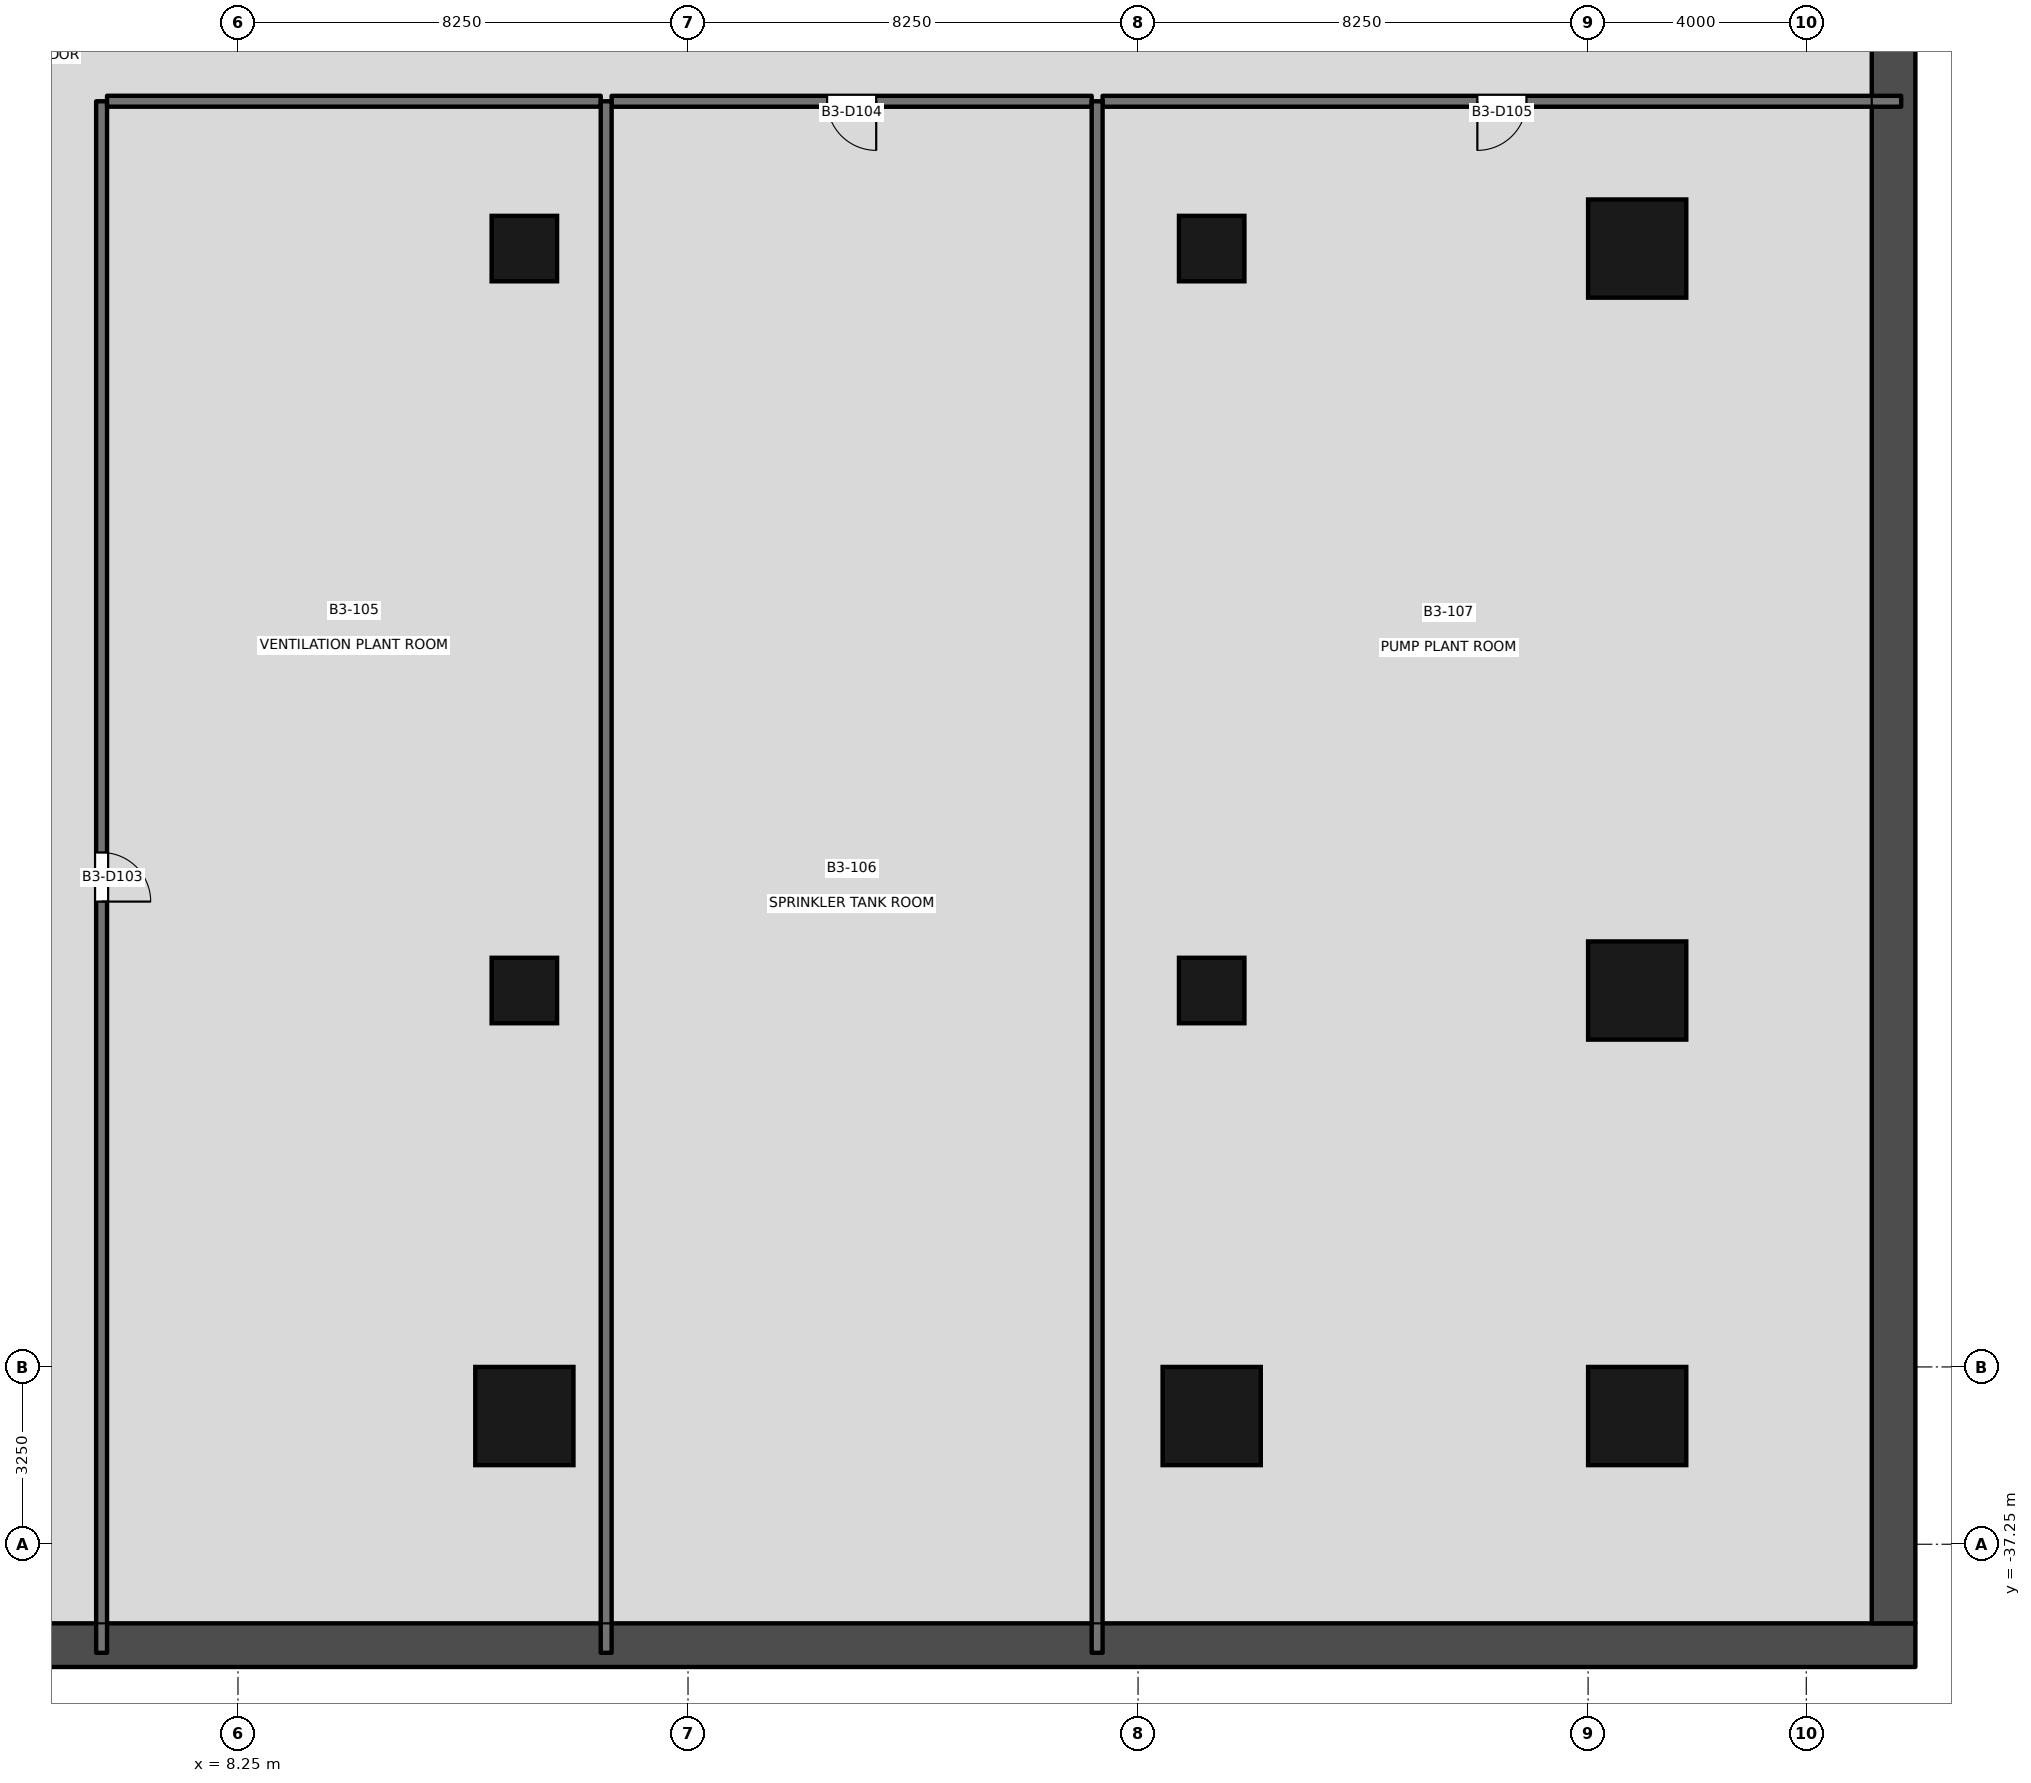
"""IFC4 building model, lengths in metres.
Left out: names, types, materials, properties, quantities, classifications, styles, units other than length and angle.
Written with IfcOpenShell. Run it as: python <this file> out.ifc"""

import sys

from ifc_helpers import new_model, si_unit, direction, frame, frame_2d, origin, origin_2d, place, context, subcontext, project, spatial, rectangle, extrude, element, fill, save


model = new_model("IFC4")
c1 = context("Model", 3, precision=1e-05, world=origin(), true_north=direction((0.0, 1.0)))
c2 = subcontext(c1, "Body", "Model", "MODEL_VIEW")
j1 = project(units=[si_unit("LENGTHUNIT", "METRE"), si_unit("PLANEANGLEUNIT", "RADIAN")], contexts=[c1])
p1 = place(None, origin())
s1 = spatial("IfcSite", under=j1, at=p1, CompositionType="ELEMENT")
p2 = place(p1, origin())
s2 = spatial("IfcBuilding", under=s1, at=p2, CompositionType="ELEMENT")
p3 = place(p2, frame((0.0, 0.0, -13.5)))
s3 = spatial("IfcBuildingStorey", under=s2, at=p3, CompositionType="ELEMENT", Elevation=-13.5)
p4 = place(p3, frame((-39.0, -39.1, -0.25), z_axis=(0.0, 0.0, 1.0), x_axis=(1.0, 0.0, 0.0)))
e1 = element("IfcWall", 1, at=p4, inside=s3, PredefinedType="SOLIDWALL", context=c2, shape_type="SweptSolid", body=[
    extrude(rectangle(XDim=78.0, YDim=0.8, at=frame_2d((39.0, 0.0))), origin(), (0.0, 0.0, 1.0), 4.05),
])
p5 = place(p3, frame((38.6, -38.7, -0.25), z_axis=(0.0, 0.0, 1.0), x_axis=(0.0, 1.0, 0.0)))
e2 = element("IfcWall", 2, at=p5, inside=s3, PredefinedType="SOLIDWALL", context=c2, shape_type="SweptSolid", body=[
    extrude(rectangle(XDim=51.9, YDim=0.8, at=frame_2d((25.95, 0.0))), origin(), (0.0, 0.0, 1.0), 4.05),
])
for number, where, z_axis, x_axis in (
    (3, (33.9, -34.9, -0.25), (0.0, 0.0, 1.0), (1.0, 0.0, 0.0)),
    (4, (13.5, -34.9, -0.25), (0.0, 0.0, 1.0), (1.0, 0.0, 0.0)),
    (5, (26.1, -34.9, -0.25), (0.0, 0.0, 1.0), (1.0, 0.0, 0.0)),
    (6, (33.9, -27.1, -0.25), (0.0, 0.0, 1.0), (0.0, 1.0, 0.0)),
    (7, (33.9, -13.5, -0.25), (0.0, 0.0, 1.0), (0.0, 1.0, 0.0)),
):
    element("IfcColumn", number, at=place(p3, frame(where, z_axis=z_axis, x_axis=x_axis)), inside=s3, PredefinedType="COLUMN", context=c2, shape_type="SweptSolid", body=[
        extrude(rectangle(XDim=1.8, YDim=1.8, at=origin_2d()), origin(), (0.0, 0.0, 1.0), 4.05),
    ])
for number, where, z_axis, x_axis in (
    (8, (13.5, -27.1, -0.25), (0.0, 0.0, 1.0), (1.0, 0.0, 0.0)),
    (9, (26.1, -27.1, -0.25), (0.0, 0.0, 1.0), (1.0, 0.0, 0.0)),
    (10, (13.5, -13.5, -0.25), (0.0, 0.0, 1.0), (1.0, 0.0, 0.0)),
    (11, (26.1, -13.5, -0.25), (0.0, 0.0, 1.0), (1.0, 0.0, 0.0)),
):
    element("IfcColumn", number, at=place(p3, frame(where, z_axis=z_axis, x_axis=x_axis)), inside=s3, PredefinedType="COLUMN", context=c2, shape_type="SweptSolid", body=[
        extrude(rectangle(XDim=1.2, YDim=1.2, at=origin_2d()), origin(), (0.0, 0.0, 1.0), 4.05),
    ])
p6 = place(p3, frame((5.75, -10.8, 0.0), z_axis=(0.0, 0.0, 1.0), x_axis=(0.0, -1.0, 0.0)))
e12 = element("IfcWall", 12, at=p6, inside=s3, PredefinedType="PARTITIONING", context=c2, shape_type="SweptSolid", body=[
    extrude(rectangle(XDim=28.44, YDim=0.2, at=frame_2d((14.22, 0.0))), origin(), (0.0, 0.0, 1.0), 2.8),
])
p7 = place(p6, frame((13.77, 0.0, 0.0)))
e13 = element("IfcOpeningElement", 13, at=p7, cuts=e12, PredefinedType="OPENING", context=c2, shape_type="SweptSolid", body=[
    extrude(rectangle(XDim=0.9, YDim=2.1, at=frame_2d((0.45, 1.05))), frame((0.0, 0.111, 0.0), z_axis=(0.0, -1.0, 0.0), x_axis=(1.0, 0.0, 0.0)), (0.0, 0.0, 1.0), 0.221),
])
p8 = place(p3, frame((14.9, -10.799, 0.0), z_axis=(0.0, 0.0, 1.0), x_axis=(-1.0, 0.0, 0.0)))
e14 = element("IfcWall", 14, at=p8, inside=s3, PredefinedType="PARTITIONING", context=c2, shape_type="SweptSolid", body=[
    extrude(rectangle(XDim=9.05, YDim=0.2, at=frame_2d((4.525, 0.0))), origin(), (0.0, 0.0, 1.0), 2.4),
])
p9 = place(p3, frame((23.9, -10.8, 0.0), z_axis=(0.0, 0.0, 1.0), x_axis=(-1.0, 0.0, 0.0)))
e15 = element("IfcWall", 15, at=p9, inside=s3, PredefinedType="PARTITIONING", context=c2, shape_type="SweptSolid", body=[
    extrude(rectangle(XDim=8.8, YDim=0.2, at=frame_2d((4.4, 0.0))), origin(), (0.0, 0.0, 1.0), 3.5),
])
p10 = place(p9, frame((3.95, 0.0, 0.0)))
e16 = element("IfcOpeningElement", 16, at=p10, cuts=e15, PredefinedType="OPENING", context=c2, shape_type="SweptSolid", body=[
    extrude(rectangle(XDim=0.9, YDim=2.1, at=frame_2d((0.45, 1.05))), frame((0.0, 0.111, 0.0), z_axis=(0.0, -1.0, 0.0), x_axis=(1.0, 0.0, 0.0)), (0.0, 0.0, 1.0), 0.221),
])
p11 = place(p3, frame((38.74, -10.8, 0.0), z_axis=(0.0, 0.0, 1.0), x_axis=(-1.0, 0.0, 0.0)))
e17 = element("IfcWall", 17, at=p11, inside=s3, PredefinedType="PARTITIONING", context=c2, shape_type="SweptSolid", body=[
    extrude(rectangle(XDim=14.64, YDim=0.2, at=frame_2d((7.32, 0.0))), origin(), (0.0, 0.0, 1.0), 2.6),
])
p12 = place(p11, frame((6.87, 0.0, 0.0)))
e18 = element("IfcOpeningElement", 18, at=p12, cuts=e17, PredefinedType="OPENING", context=c2, shape_type="SweptSolid", body=[
    extrude(rectangle(XDim=0.9, YDim=2.1, at=frame_2d((0.45, 1.05))), frame((0.0, 0.111, 0.0), z_axis=(0.0, -1.0, 0.0), x_axis=(1.0, 0.0, 0.0)), (0.0, 0.0, 1.0), 0.221),
])
for number, where, z_axis, x_axis in (
    (19, (15.0, -10.8, 0.0), (0.0, 0.0, 1.0), (0.0, -1.0, 0.0)),
    (20, (24.0, -10.8, 0.0), (0.0, 0.0, 1.0), (0.0, -1.0, 0.0)),
):
    element("IfcWall", number, at=place(p3, frame(where, z_axis=z_axis, x_axis=x_axis)), inside=s3, PredefinedType="PARTITIONING", context=c2, shape_type="SweptSolid", body=[
        extrude(rectangle(XDim=28.44, YDim=0.2, at=frame_2d((14.22, 0.0))), origin(), (0.0, 0.0, 1.0), 2.8),
    ])
p13 = place(p7, origin())
e21 = element("IfcDoor", 21, at=p13, inside=s3, OperationType="SINGLE_SWING_RIGHT", PredefinedType="DOOR", context=c2, shape_type="SweptSolid", body=[
    extrude(rectangle(XDim=0.9, YDim=2.1, at=frame_2d((0.45, 1.05))), frame((0.0, 0.025, 0.0), z_axis=(0.0, -1.0, 0.0), x_axis=(1.0, 0.0, 0.0)), (0.0, 0.0, 1.0), 0.05),
])
fill(e13, e21)
p14 = place(p10, origin())
e22 = element("IfcDoor", 22, at=p14, inside=s3, OperationType="SINGLE_SWING_LEFT", PredefinedType="DOOR", context=c2, shape_type="SweptSolid", body=[
    extrude(rectangle(XDim=0.9, YDim=2.1, at=frame_2d((0.45, 1.05))), frame((0.0, 0.025, 0.0), z_axis=(0.0, -1.0, 0.0), x_axis=(1.0, 0.0, 0.0)), (0.0, 0.0, 1.0), 0.05),
])
fill(e16, e22)
p15 = place(p12, origin())
e23 = element("IfcDoor", 23, at=p15, inside=s3, OperationType="SINGLE_SWING_RIGHT", PredefinedType="DOOR", context=c2, shape_type="SweptSolid", body=[
    extrude(rectangle(XDim=0.9, YDim=2.1, at=frame_2d((0.45, 1.05))), frame((0.0, 0.025, 0.0), z_axis=(0.0, -1.0, 0.0), x_axis=(1.0, 0.0, 0.0)), (0.0, 0.0, 1.0), 0.05),
])
fill(e18, e23)
save(model, sys.argv[1])
